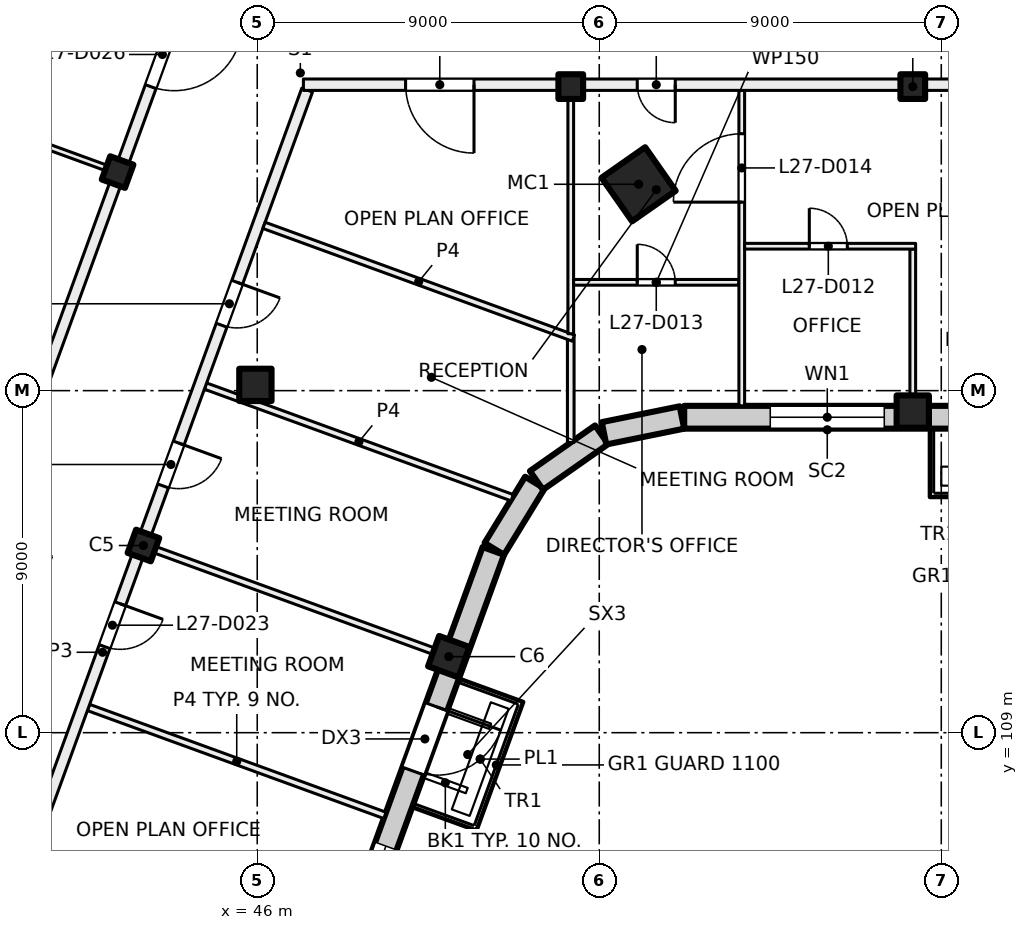
"""IFC4 building model, lengths in metres.
Left out: names, types, materials, properties, quantities, classifications, styles, units other than length and angle.
Written with IfcOpenShell. Run it as: python <this file> out.ifc"""

import sys

from ifc_helpers import new_model, si_unit, direction, frame, frame_2d, origin, origin_2d, place, context, subcontext, project, spatial, rectangle, hollow_rectangle, extrude, element, fill, save


model = new_model("IFC4")
c1 = context("Model", 3, precision=1e-05, world=origin(), true_north=direction((0.0, 1.0)))
c2 = subcontext(c1, "Body", "Model", "MODEL_VIEW")
j1 = project(units=[si_unit("LENGTHUNIT", "METRE"), si_unit("PLANEANGLEUNIT", "RADIAN")], contexts=[c1])
p1 = place(None, origin())
s1 = spatial("IfcSite", under=j1, at=p1, CompositionType="ELEMENT")
p2 = place(p1, origin())
s2 = spatial("IfcBuilding", under=s1, at=p2, CompositionType="ELEMENT")
p3 = place(p2, frame((0.0, 0.0, 117.0)))
s3 = spatial("IfcBuildingStorey", under=s2, at=p3, CompositionType="ELEMENT", Elevation=117.0)
p4 = place(p3, frame((56.036, 123.43, 0.0), z_axis=(0.0, 0.0, 1.0), x_axis=(0.573576436351, -0.819152044289, 0.0)))
e1 = element("IfcColumn", 1, at=p4, inside=s3, PredefinedType="COLUMN", context=c2, shape_type="SweptSolid", body=[
    extrude(hollow_rectangle(XDim=1.4, YDim=1.4, WallThickness=0.04, at=origin_2d()), origin(), (0.0, 0.0, 1.0), 4.0),
])
for number, where, z_axis, x_axis in (
    (2, (54.25, 126.0, 0.0), (0.0, 0.0, 1.0), (1.0, 0.0, 0.0)),
    (3, (63.25, 126.0, 0.0), (0.0, 0.0, 1.0), (1.0, 0.0, 0.0)),
):
    element("IfcColumn", number, at=place(p3, frame(where, z_axis=z_axis, x_axis=x_axis)), inside=s3, PredefinedType="COLUMN", context=c2, shape_type="SweptSolid", body=[
        extrude(rectangle(XDim=0.65, YDim=0.65, at=origin_2d()), origin(), (0.0, 0.0, 1.0), 4.0),
    ])
for number, where, z_axis, x_axis in (
    (4, (45.952, 118.152, 0.0), (0.0, 0.0, 1.0), (1.0, 0.0, 0.0)),
    (5, (63.25, 117.45, 0.0), (0.0, 0.0, 1.0), (1.0, 0.0, 0.0)),
):
    element("IfcColumn", number, at=place(p3, frame(where, z_axis=z_axis, x_axis=x_axis)), inside=s3, PredefinedType="COLUMN", context=c2, shape_type="SweptSolid", body=[
        extrude(rectangle(XDim=0.85, YDim=0.85, at=origin_2d()), origin(), (0.0, 0.0, 1.0), 4.0),
    ])
for number, where, z_axis, x_axis in (
    (6, (43.006, 113.925, 0.0), (0.0, 0.0, 1.0), (-0.342, -0.94, 0.0)),
    (7, (42.325, 123.751, 0.0), (0.0, 0.0, 1.0), (-0.342, -0.94, 0.0)),
):
    element("IfcColumn", number, at=place(p3, frame(where, z_axis=z_axis, x_axis=x_axis)), inside=s3, PredefinedType="COLUMN", context=c2, shape_type="SweptSolid", body=[
        extrude(rectangle(XDim=0.65, YDim=0.65, at=origin_2d()), origin(), (0.0, 0.0, 1.0), 4.0),
    ])
p5 = place(p3, frame((51.04, 111.001, 0.0), z_axis=(0.0, 0.0, 1.0), x_axis=(-0.342020143326, -0.939692620786, 0.0)))
e8 = element("IfcColumn", 8, at=p5, inside=s3, PredefinedType="COLUMN", context=c2, shape_type="SweptSolid", body=[
    extrude(rectangle(XDim=0.85, YDim=0.85, at=origin_2d()), origin(), (0.0, 0.0, 1.0), 4.0),
])
p6 = place(p3, frame((52.212, 113.783, 0.0), z_axis=(0.0, 0.0, 1.0), x_axis=(-0.34202521188, -0.939690775968, 0.0)))
e9 = element("IfcWall", 9, at=p6, inside=s3, PredefinedType="SOLIDWALL", context=c2, shape_type="SweptSolid", body=[
    extrude(rectangle(XDim=21.745, YDim=0.6, at=frame_2d((10.873, 0.0))), origin(), (0.0, 0.0, 1.0), 3.625),
])
p7 = place(p6, frame((4.365, 0.0, 0.0)))
e10 = element("IfcOpeningElement", 10, at=p7, cuts=e9, PredefinedType="OPENING", context=c2, shape_type="SweptSolid", body=[
    extrude(rectangle(XDim=1.8, YDim=2.4, at=frame_2d((0.9, 1.2))), frame((0.0, 0.31, 0.0), z_axis=(0.0, -1.0, 0.0), x_axis=(1.0, 0.0, 0.0)), (0.0, 0.0, 1.0), 0.62),
])
p8 = place(p6, frame((8.265, 0.0, 0.9)))
e11 = element("IfcOpeningElement", 11, at=p8, cuts=e9, PredefinedType="OPENING", context=c2, shape_type="SweptSolid", body=[
    extrude(rectangle(XDim=3.0, YDim=2.4, at=frame_2d((1.5, 1.2))), frame((0.0, 0.31, 0.0), z_axis=(0.0, -1.0, 0.0), x_axis=(1.0, 0.0, 0.0)), (0.0, 0.0, 1.0), 0.62),
])
p9 = place(p6, frame((12.765, 0.0, 0.9)))
e12 = element("IfcOpeningElement", 12, at=p9, cuts=e9, PredefinedType="OPENING", context=c2, shape_type="SweptSolid", body=[
    extrude(rectangle(XDim=3.0, YDim=2.4, at=frame_2d((1.5, 1.2))), frame((0.0, 0.31, 0.0), z_axis=(0.0, -1.0, 0.0), x_axis=(1.0, 0.0, 0.0)), (0.0, 0.0, 1.0), 0.62),
])
p10 = place(p6, frame((17.265, 0.0, 0.9)))
e13 = element("IfcOpeningElement", 13, at=p10, cuts=e9, PredefinedType="OPENING", context=c2, shape_type="SweptSolid", body=[
    extrude(rectangle(XDim=3.0, YDim=2.4, at=frame_2d((1.5, 1.2))), frame((0.0, 0.31, 0.0), z_axis=(0.0, -1.0, 0.0), x_axis=(1.0, 0.0, 0.0)), (0.0, 0.0, 1.0), 0.62),
])
p11 = place(p3, frame((53.305, 115.578, 0.0), z_axis=(0.0, 0.0, 1.0), x_axis=(-0.522402266438, -0.852699168535, 0.0)))
e14 = element("IfcWall", 14, at=p11, inside=s3, PredefinedType="SOLIDWALL", context=c2, shape_type="SweptSolid", body=[
    extrude(rectangle(XDim=2.042, YDim=0.6, at=frame_2d((1.021, 0.0))), origin(), (0.0, 0.0, 1.0), 3.625),
])
for number, where, z_axis, x_axis in (
    (15, (55.062, 116.839, 0.0), (0.0, 0.0, 1.0), (-0.819, -0.574, 0.0)),
    (16, (57.175, 117.294, 0.0), (0.0, 0.0, 1.0), (-0.98, -0.199, 0.0)),
):
    element("IfcWall", number, at=place(p3, frame(where, z_axis=z_axis, x_axis=x_axis)), inside=s3, PredefinedType="SOLIDWALL", context=c2, shape_type="SweptSolid", body=[
        extrude(rectangle(XDim=2.092, YDim=0.6, at=frame_2d((1.046, 0.0))), origin(), (0.0, 0.0, 1.0), 3.625),
    ])
p12 = place(p3, frame((90.98, 117.3, 0.0), z_axis=(0.0, 0.0, 1.0), x_axis=(-1.0, 0.0, 0.0)))
e17 = element("IfcWall", 17, at=p12, inside=s3, PredefinedType="SOLIDWALL", context=c2, shape_type="SweptSolid", body=[
    extrude(rectangle(XDim=33.745, YDim=0.6, at=frame_2d((16.873, 0.0))), origin(), (0.0, 0.0, 1.0), 3.625),
])
p13 = place(p12, frame((1.48, 0.0, 0.9)))
e18 = element("IfcOpeningElement", 18, at=p13, cuts=e17, PredefinedType="OPENING", context=c2, shape_type="SweptSolid", body=[
    extrude(rectangle(XDim=3.0, YDim=2.4, at=frame_2d((1.5, 1.2))), frame((0.0, 0.31, 0.0), z_axis=(0.0, -1.0, 0.0), x_axis=(1.0, 0.0, 0.0)), (0.0, 0.0, 1.0), 0.62),
])
p14 = place(p12, frame((5.98, 0.0, 0.9)))
e19 = element("IfcOpeningElement", 19, at=p14, cuts=e17, PredefinedType="OPENING", context=c2, shape_type="SweptSolid", body=[
    extrude(rectangle(XDim=3.0, YDim=2.4, at=frame_2d((1.5, 1.2))), frame((0.0, 0.31, 0.0), z_axis=(0.0, -1.0, 0.0), x_axis=(1.0, 0.0, 0.0)), (0.0, 0.0, 1.0), 0.62),
])
p15 = place(p12, frame((10.48, 0.0, 0.9)))
e20 = element("IfcOpeningElement", 20, at=p15, cuts=e17, PredefinedType="OPENING", context=c2, shape_type="SweptSolid", body=[
    extrude(rectangle(XDim=3.0, YDim=2.4, at=frame_2d((1.5, 1.2))), frame((0.0, 0.31, 0.0), z_axis=(0.0, -1.0, 0.0), x_axis=(1.0, 0.0, 0.0)), (0.0, 0.0, 1.0), 0.62),
])
p16 = place(p12, frame((14.98, 0.0, 0.9)))
e21 = element("IfcOpeningElement", 21, at=p16, cuts=e17, PredefinedType="OPENING", context=c2, shape_type="SweptSolid", body=[
    extrude(rectangle(XDim=3.0, YDim=2.4, at=frame_2d((1.5, 1.2))), frame((0.0, 0.31, 0.0), z_axis=(0.0, -1.0, 0.0), x_axis=(1.0, 0.0, 0.0)), (0.0, 0.0, 1.0), 0.62),
])
p17 = place(p12, frame((19.48, 0.0, 0.9)))
e22 = element("IfcOpeningElement", 22, at=p17, cuts=e17, PredefinedType="OPENING", context=c2, shape_type="SweptSolid", body=[
    extrude(rectangle(XDim=3.0, YDim=2.4, at=frame_2d((1.5, 1.2))), frame((0.0, 0.31, 0.0), z_axis=(0.0, -1.0, 0.0), x_axis=(1.0, 0.0, 0.0)), (0.0, 0.0, 1.0), 0.62),
])
p18 = place(p12, frame((24.58, 0.0, 0.0)))
e23 = element("IfcOpeningElement", 23, at=p18, cuts=e17, PredefinedType="OPENING", context=c2, shape_type="SweptSolid", body=[
    extrude(rectangle(XDim=1.8, YDim=2.4, at=frame_2d((0.9, 1.2))), frame((0.0, 0.31, 0.0), z_axis=(0.0, -1.0, 0.0), x_axis=(1.0, 0.0, 0.0)), (0.0, 0.0, 1.0), 0.62),
])
p19 = place(p12, frame((28.48, 0.0, 0.9)))
e24 = element("IfcOpeningElement", 24, at=p19, cuts=e17, PredefinedType="OPENING", context=c2, shape_type="SweptSolid", body=[
    extrude(rectangle(XDim=3.0, YDim=2.4, at=frame_2d((1.5, 1.2))), frame((0.0, 0.31, 0.0), z_axis=(0.0, -1.0, 0.0), x_axis=(1.0, 0.0, 0.0)), (0.0, 0.0, 1.0), 0.62),
])
p20 = place(p3, frame((44.686, 130.091, 0.0), z_axis=(0.0, 0.0, 1.0), x_axis=(-0.342017360004, -0.939693633828, 0.0)))
e25 = element("IfcWall", 25, at=p20, inside=s3, PredefinedType="PARTITIONING", context=c2, shape_type="SweptSolid", body=[
    extrude(rectangle(XDim=34.516, YDim=0.3, at=frame_2d((17.258, 0.0))), origin(), (0.0, 0.0, 1.0), 3.625),
])
p21 = place(p20, frame((27.515, 0.0, 0.0)))
e26 = element("IfcOpeningElement", 26, at=p21, cuts=e25, PredefinedType="OPENING", context=c2, shape_type="SweptSolid", body=[
    extrude(rectangle(XDim=1.0, YDim=2.1, at=frame_2d((0.5, 1.05))), frame((0.0, 0.16, 0.0), z_axis=(0.0, -1.0, 0.0), x_axis=(1.0, 0.0, 0.0)), (0.0, 0.0, 1.0), 0.32),
])
p22 = place(p20, frame((16.865, 0.0, 0.0)))
e27 = element("IfcOpeningElement", 27, at=p22, cuts=e25, PredefinedType="OPENING", context=c2, shape_type="SweptSolid", body=[
    extrude(rectangle(XDim=1.8, YDim=2.1, at=frame_2d((0.9, 1.05))), frame((0.0, 0.16, 0.0), z_axis=(0.0, -1.0, 0.0), x_axis=(1.0, 0.0, 0.0)), (0.0, 0.0, 1.0), 0.32),
])
p23 = place(p20, frame((2.554, 0.0, 0.0)))
e28 = element("IfcOpeningElement", 28, at=p23, cuts=e25, PredefinedType="OPENING", context=c2, shape_type="SweptSolid", body=[
    extrude(rectangle(XDim=1.8, YDim=2.1, at=frame_2d((0.9, 1.05))), frame((0.0, 0.16, 0.0), z_axis=(0.0, -1.0, 0.0), x_axis=(1.0, 0.0, 0.0)), (0.0, 0.0, 1.0), 0.32),
])
p24 = place(p3, frame((41.561, 109.663, 0.0), z_axis=(0.0, 0.0, 1.0), x_axis=(0.939673986983, -0.342071334939, 0.0)))
e29 = element("IfcWall", 29, at=p24, inside=s3, PredefinedType="PARTITIONING", context=c2, shape_type="SweptSolid", body=[
    extrude(rectangle(XDim=8.3, YDim=0.175, at=frame_2d((4.15, 0.0))), origin(), (0.0, 0.0, 1.0), 3.625),
])
p25 = place(p3, frame((42.231, 123.785, 0.0), z_axis=(0.0, 0.0, 1.0), x_axis=(-0.939687752599, 0.342033518263, 0.0)))
e30 = element("IfcWall", 30, at=p25, inside=s3, PredefinedType="PARTITIONING", context=c2, shape_type="SweptSolid", body=[
    extrude(rectangle(XDim=8.301, YDim=0.15, at=frame_2d((4.15, 0.0))), origin(), (0.0, 0.0, 1.0), 3.625),
])
p26 = place(p3, frame((43.1, 113.891, 0.0), z_axis=(0.0, 0.0, 1.0), x_axis=(0.939670544866, -0.342080790328, 0.0)))
e31 = element("IfcWall", 31, at=p26, inside=s3, PredefinedType="PARTITIONING", context=c2, shape_type="SweptSolid", body=[
    extrude(rectangle(XDim=8.3, YDim=0.175, at=frame_2d((4.15, 0.0))), origin(), (0.0, 0.0, 1.0), 3.625),
])
p27 = place(p3, frame((44.639, 118.12, 0.0), z_axis=(0.0, 0.0, 1.0), x_axis=(0.939669707102, -0.342083091593, 0.0)))
e32 = element("IfcWall", 32, at=p27, inside=s3, PredefinedType="PARTITIONING", context=c2, shape_type="SweptSolid", body=[
    extrude(rectangle(XDim=8.589, YDim=0.175, at=frame_2d((4.295, 0.0))), origin(), (0.0, 0.0, 1.0), 3.625),
])
p28 = place(p3, frame((47.314, 125.909, 0.0), z_axis=(0.0, 0.0, 1.0), x_axis=(-0.342010770371, -0.939696032209, 0.0)))
e33 = element("IfcWall", 33, at=p28, inside=s3, PredefinedType="PARTITIONING", context=c2, shape_type="SweptSolid", body=[
    extrude(rectangle(XDim=31.485, YDim=0.3, at=frame_2d((15.742, 0.0))), origin(), (0.0, 0.0, 1.0), 3.625),
])
p29 = place(p28, frame((23.459, 0.0, 0.0)))
e34 = element("IfcOpeningElement", 34, at=p29, cuts=e33, PredefinedType="OPENING", context=c2, shape_type="SweptSolid", body=[
    extrude(rectangle(XDim=1.8, YDim=2.1, at=frame_2d((0.9, 1.05))), frame((0.0, 0.16, 0.0), z_axis=(0.0, -1.0, 0.0), x_axis=(1.0, 0.0, 0.0)), (0.0, 0.0, 1.0), 0.32),
])
p30 = place(p28, frame((14.385, 0.0, 0.0)))
e35 = element("IfcOpeningElement", 35, at=p30, cuts=e33, PredefinedType="OPENING", context=c2, shape_type="SweptSolid", body=[
    extrude(rectangle(XDim=1.2, YDim=2.1, at=frame_2d((0.6, 1.05))), frame((0.0, 0.16, 0.0), z_axis=(0.0, -1.0, 0.0), x_axis=(1.0, 0.0, 0.0)), (0.0, 0.0, 1.0), 0.32),
])
p31 = place(p28, frame((9.885, 0.0, 0.0)))
e36 = element("IfcOpeningElement", 36, at=p31, cuts=e33, PredefinedType="OPENING", context=c2, shape_type="SweptSolid", body=[
    extrude(rectangle(XDim=1.2, YDim=2.1, at=frame_2d((0.6, 1.05))), frame((0.0, 0.16, 0.0), z_axis=(0.0, -1.0, 0.0), x_axis=(1.0, 0.0, 0.0)), (0.0, 0.0, 1.0), 0.32),
])
p32 = place(p28, frame((5.384, 0.0, 0.0)))
e37 = element("IfcOpeningElement", 37, at=p32, cuts=e33, PredefinedType="OPENING", context=c2, shape_type="SweptSolid", body=[
    extrude(rectangle(XDim=1.2, YDim=2.1, at=frame_2d((0.6, 1.05))), frame((0.0, 0.16, 0.0), z_axis=(0.0, -1.0, 0.0), x_axis=(1.0, 0.0, 0.0)), (0.0, 0.0, 1.0), 0.32),
])
p33 = place(p3, frame((54.25, 116.637, 0.0), z_axis=(0.0, 0.0, 1.0), x_axis=(0.0, 1.0, 0.0)))
e38 = element("IfcWall", 38, at=p33, inside=s3, PredefinedType="PARTITIONING", context=c2, shape_type="SweptSolid", body=[
    extrude(rectangle(XDim=2.776, YDim=0.175, at=frame_2d((1.388, 0.0))), origin(), (0.0, 0.0, 1.0), 3.625),
])
p34 = place(p3, frame((54.32, 119.384, 0.0), z_axis=(0.0, 0.0, 1.0), x_axis=(-0.939632908118, 0.342184157994, 0.0)))
e39 = element("IfcWall", 39, at=p34, inside=s3, PredefinedType="PARTITIONING", context=c2, shape_type="SweptSolid", body=[
    extrude(rectangle(XDim=8.665, YDim=0.175, at=frame_2d((4.333, 0.0))), origin(), (0.0, 0.0, 1.0), 3.625),
])
p35 = place(p3, frame((54.25, 119.498, 0.0), z_axis=(0.0, 0.0, 1.0), x_axis=(0.0, 1.0, 0.0)))
e40 = element("IfcWall", 40, at=p35, inside=s3, PredefinedType="PARTITIONING", context=c2, shape_type="SweptSolid", body=[
    extrude(rectangle(XDim=6.402, YDim=0.15, at=frame_2d((3.201, 0.0))), origin(), (0.0, 0.0, 1.0), 3.625),
])
p36 = place(p3, frame((54.325, 120.85, 0.0), z_axis=(0.0, 0.0, 1.0), x_axis=(1.0, 0.0, 0.0)))
e41 = element("IfcWall", 41, at=p36, inside=s3, PredefinedType="PARTITIONING", context=c2, shape_type="SweptSolid", body=[
    extrude(rectangle(XDim=4.35, YDim=0.15, at=frame_2d((2.175, 0.0))), origin(), (0.0, 0.0, 1.0), 3.625),
])
p37 = place(p36, frame((1.675, 0.0, 0.0)))
e42 = element("IfcOpeningElement", 42, at=p37, cuts=e41, PredefinedType="OPENING", context=c2, shape_type="SweptSolid", body=[
    extrude(rectangle(XDim=1.0, YDim=2.1, at=frame_2d((0.5, 1.05))), frame((0.0, 0.085, 0.0), z_axis=(0.0, -1.0, 0.0), x_axis=(1.0, 0.0, 0.0)), (0.0, 0.0, 1.0), 0.17),
])
p38 = place(p3, frame((58.75, 117.6, 0.0), z_axis=(0.0, 0.0, 1.0), x_axis=(0.0, 1.0, 0.0)))
e43 = element("IfcWall", 43, at=p38, inside=s3, PredefinedType="PARTITIONING", context=c2, shape_type="SweptSolid", body=[
    extrude(rectangle(XDim=8.3, YDim=0.15, at=frame_2d((4.15, 0.0))), origin(), (0.0, 0.0, 1.0), 3.625),
])
p39 = place(p38, frame((5.36, 0.0, 0.0)))
e44 = element("IfcOpeningElement", 44, at=p39, cuts=e43, PredefinedType="OPENING", context=c2, shape_type="SweptSolid", body=[
    extrude(rectangle(XDim=1.8, YDim=2.1, at=frame_2d((0.9, 1.05))), frame((0.0, 0.085, 0.0), z_axis=(0.0, -1.0, 0.0), x_axis=(1.0, 0.0, 0.0)), (0.0, 0.0, 1.0), 0.17),
])
p40 = place(p3, frame((63.25, 117.6, 0.0), z_axis=(0.0, 0.0, 1.0), x_axis=(0.0, 1.0, 0.0)))
e45 = element("IfcWall", 45, at=p40, inside=s3, PredefinedType="PARTITIONING", context=c2, shape_type="SweptSolid", body=[
    extrude(rectangle(XDim=4.125, YDim=0.15, at=frame_2d((2.062, 0.0))), origin(), (0.0, 0.0, 1.0), 3.625),
])
p41 = place(p3, frame((58.825, 121.8, 0.0), z_axis=(0.0, 0.0, 1.0), x_axis=(1.0, 0.0, 0.0)))
e46 = element("IfcWall", 46, at=p41, inside=s3, PredefinedType="PARTITIONING", context=c2, shape_type="SweptSolid", body=[
    extrude(rectangle(XDim=4.5, YDim=0.15, at=frame_2d((2.25, 0.0))), origin(), (0.0, 0.0, 1.0), 3.625),
])
p42 = place(p41, frame((1.702, 0.0, 0.0)))
e47 = element("IfcOpeningElement", 47, at=p42, cuts=e46, PredefinedType="OPENING", context=c2, shape_type="SweptSolid", body=[
    extrude(rectangle(XDim=1.0, YDim=2.1, at=frame_2d((0.5, 1.05))), frame((0.0, 0.085, 0.0), z_axis=(0.0, -1.0, 0.0), x_axis=(1.0, 0.0, 0.0)), (0.0, 0.0, 1.0), 0.17),
])
p43 = place(p3, frame((91.0, 126.05, 0.0), z_axis=(0.0, 0.0, 1.0), x_axis=(-1.0, 0.0, 0.0)))
e48 = element("IfcWall", 48, at=p43, inside=s3, PredefinedType="PARTITIONING", context=c2, shape_type="SweptSolid", body=[
    extrude(rectangle(XDim=43.785, YDim=0.3, at=frame_2d((21.893, 0.0))), origin(), (0.0, 0.0, 1.0), 3.625),
])
p44 = place(p43, frame((7.0, 0.0, 0.0)))
e49 = element("IfcOpeningElement", 49, at=p44, cuts=e48, PredefinedType="OPENING", context=c2, shape_type="SweptSolid", body=[
    extrude(rectangle(XDim=1.0, YDim=2.1, at=frame_2d((0.5, 1.05))), frame((0.0, 0.16, 0.0), z_axis=(0.0, -1.0, 0.0), x_axis=(1.0, 0.0, 0.0)), (0.0, 0.0, 1.0), 0.32),
])
p45 = place(p43, frame((15.6, 0.0, 0.0)))
e50 = element("IfcOpeningElement", 50, at=p45, cuts=e48, PredefinedType="OPENING", context=c2, shape_type="SweptSolid", body=[
    extrude(rectangle(XDim=1.8, YDim=2.1, at=frame_2d((0.9, 1.05))), frame((0.0, 0.16, 0.0), z_axis=(0.0, -1.0, 0.0), x_axis=(1.0, 0.0, 0.0)), (0.0, 0.0, 1.0), 0.32),
])
p46 = place(p43, frame((34.0, 0.0, 0.0)))
e51 = element("IfcOpeningElement", 51, at=p46, cuts=e48, PredefinedType="OPENING", context=c2, shape_type="SweptSolid", body=[
    extrude(rectangle(XDim=1.0, YDim=2.1, at=frame_2d((0.5, 1.05))), frame((0.0, 0.16, 0.0), z_axis=(0.0, -1.0, 0.0), x_axis=(1.0, 0.0, 0.0)), (0.0, 0.0, 1.0), 0.32),
])
p47 = place(p43, frame((39.296, 0.0, 0.0)))
e52 = element("IfcOpeningElement", 52, at=p47, cuts=e48, PredefinedType="OPENING", context=c2, shape_type="SweptSolid", body=[
    extrude(rectangle(XDim=1.8, YDim=2.1, at=frame_2d((0.9, 1.05))), frame((0.0, 0.16, 0.0), z_axis=(0.0, -1.0, 0.0), x_axis=(1.0, 0.0, 0.0)), (0.0, 0.0, 1.0), 0.32),
])
p48 = place(p7, origin())
e53 = element("IfcDoor", 53, at=p48, inside=s3, OperationType="DOUBLE_DOOR_SINGLE_SWING", PredefinedType="DOOR", context=c2, shape_type="SweptSolid", body=[
    extrude(rectangle(XDim=1.8, YDim=2.4, at=frame_2d((0.9, 1.2))), frame((0.0, 0.025, 0.0), z_axis=(0.0, -1.0, 0.0), x_axis=(1.0, 0.0, 0.0)), (0.0, 0.0, 1.0), 0.05),
])
fill(e10, e53)
p49 = place(p8, origin())
e54 = element("IfcWindow", 54, at=p49, inside=s3, PartitioningType="SINGLE_PANEL", PredefinedType="WINDOW", context=c2, shape_type="SweptSolid", body=[
    extrude(rectangle(XDim=3.0, YDim=2.4, at=frame_2d((1.5, 1.2))), frame((0.0, 0.03, 0.0), z_axis=(0.0, -1.0, 0.0), x_axis=(1.0, 0.0, 0.0)), (0.0, 0.0, 1.0), 0.06),
])
fill(e11, e54)
p50 = place(p19, origin())
e55 = element("IfcWindow", 55, at=p50, inside=s3, PartitioningType="SINGLE_PANEL", PredefinedType="WINDOW", context=c2, shape_type="SweptSolid", body=[
    extrude(rectangle(XDim=3.0, YDim=2.4, at=frame_2d((1.5, 1.2))), frame((0.0, 0.03, 0.0), z_axis=(0.0, -1.0, 0.0), x_axis=(1.0, 0.0, 0.0)), (0.0, 0.0, 1.0), 0.06),
])
fill(e24, e55)
p51 = place(p46, origin())
e56 = element("IfcDoor", 56, at=p51, inside=s3, OperationType="SINGLE_SWING_LEFT", PredefinedType="DOOR", context=c2, shape_type="SweptSolid", body=[
    extrude(rectangle(XDim=1.0, YDim=2.1, at=frame_2d((0.5, 1.05))), frame((0.0, 0.025, 0.0), z_axis=(0.0, -1.0, 0.0), x_axis=(1.0, 0.0, 0.0)), (0.0, 0.0, 1.0), 0.05),
])
fill(e51, e56)
p52 = place(p42, origin())
e57 = element("IfcDoor", 57, at=p52, inside=s3, OperationType="SINGLE_SWING_LEFT", PredefinedType="DOOR", context=c2, shape_type="SweptSolid", body=[
    extrude(rectangle(XDim=1.0, YDim=2.1, at=frame_2d((0.5, 1.05))), frame((0.0, 0.025, 0.0), z_axis=(0.0, -1.0, 0.0), x_axis=(1.0, 0.0, 0.0)), (0.0, 0.0, 1.0), 0.05),
])
fill(e47, e57)
p53 = place(p37, origin())
e58 = element("IfcDoor", 58, at=p53, inside=s3, OperationType="SINGLE_SWING_LEFT", PredefinedType="DOOR", context=c2, shape_type="SweptSolid", body=[
    extrude(rectangle(XDim=1.0, YDim=2.1, at=frame_2d((0.5, 1.05))), frame((0.0, 0.025, 0.0), z_axis=(0.0, -1.0, 0.0), x_axis=(1.0, 0.0, 0.0)), (0.0, 0.0, 1.0), 0.05),
])
fill(e42, e58)
p54 = place(p39, origin())
e59 = element("IfcDoor", 59, at=p54, inside=s3, OperationType="DOUBLE_DOOR_SINGLE_SWING", PredefinedType="DOOR", context=c2, shape_type="SweptSolid", body=[
    extrude(rectangle(XDim=1.8, YDim=2.1, at=frame_2d((0.9, 1.05))), frame((0.0, 0.025, 0.0), z_axis=(0.0, -1.0, 0.0), x_axis=(1.0, 0.0, 0.0)), (0.0, 0.0, 1.0), 0.05),
])
fill(e44, e59)
p55 = place(p30, origin())
e60 = element("IfcDoor", 60, at=p55, inside=s3, OperationType="DOUBLE_DOOR_SINGLE_SWING", PredefinedType="DOOR", context=c2, shape_type="SweptSolid", body=[
    extrude(rectangle(XDim=1.2, YDim=2.1, at=frame_2d((0.6, 1.05))), frame((0.0, 0.025, 0.0), z_axis=(0.0, -1.0, 0.0), x_axis=(1.0, 0.0, 0.0)), (0.0, 0.0, 1.0), 0.05),
])
fill(e35, e60)
p56 = place(p31, origin())
e61 = element("IfcDoor", 61, at=p56, inside=s3, OperationType="DOUBLE_DOOR_SINGLE_SWING", PredefinedType="DOOR", context=c2, shape_type="SweptSolid", body=[
    extrude(rectangle(XDim=1.2, YDim=2.1, at=frame_2d((0.6, 1.05))), frame((0.0, 0.025, 0.0), z_axis=(0.0, -1.0, 0.0), x_axis=(1.0, 0.0, 0.0)), (0.0, 0.0, 1.0), 0.05),
])
fill(e36, e61)
p57 = place(p32, origin())
e62 = element("IfcDoor", 62, at=p57, inside=s3, OperationType="DOUBLE_DOOR_SINGLE_SWING", PredefinedType="DOOR", context=c2, shape_type="SweptSolid", body=[
    extrude(rectangle(XDim=1.2, YDim=2.1, at=frame_2d((0.6, 1.05))), frame((0.0, 0.025, 0.0), z_axis=(0.0, -1.0, 0.0), x_axis=(1.0, 0.0, 0.0)), (0.0, 0.0, 1.0), 0.05),
])
fill(e37, e62)
p58 = place(p23, origin())
e63 = element("IfcDoor", 63, at=p58, inside=s3, OperationType="DOUBLE_DOOR_SINGLE_SWING", PredefinedType="DOOR", context=c2, shape_type="SweptSolid", body=[
    extrude(rectangle(XDim=1.8, YDim=2.1, at=frame_2d((0.9, 1.05))), frame((0.0, 0.025, 0.0), z_axis=(0.0, -1.0, 0.0), x_axis=(1.0, 0.0, 0.0)), (0.0, 0.0, 1.0), 0.05),
])
fill(e28, e63)
p59 = place(p47, origin())
e64 = element("IfcDoor", 64, at=p59, inside=s3, OperationType="DOUBLE_DOOR_SINGLE_SWING", PredefinedType="DOOR", context=c2, shape_type="SweptSolid", body=[
    extrude(rectangle(XDim=1.8, YDim=2.1, at=frame_2d((0.9, 1.05))), frame((0.0, 0.025, 0.0), z_axis=(0.0, -1.0, 0.0), x_axis=(1.0, 0.0, 0.0)), (0.0, 0.0, 1.0), 0.05),
])
fill(e52, e64)
save(model, sys.argv[1])
